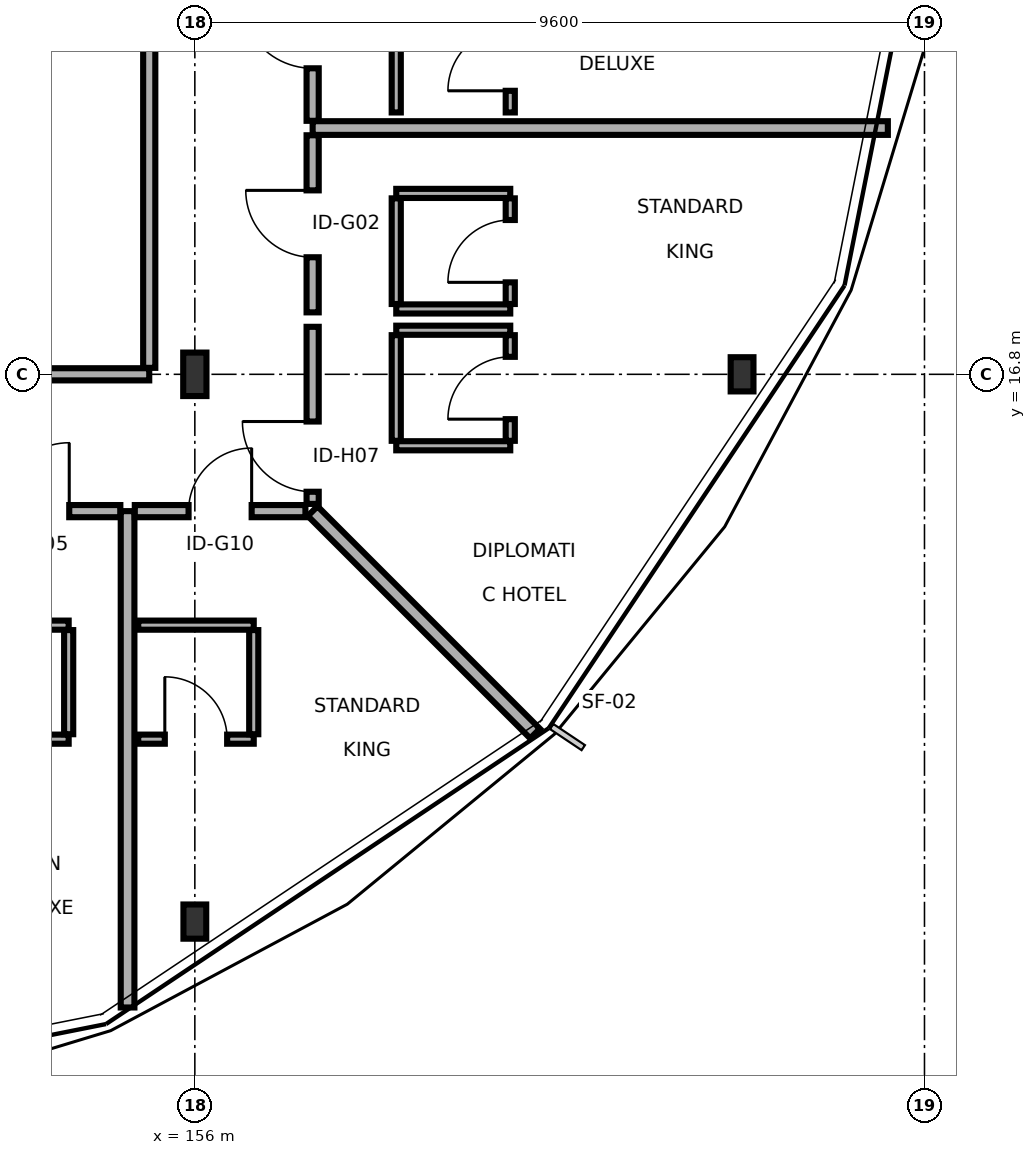
"""IFC4 building model, lengths in metres.
Left out: names, types, materials, properties, quantities, classifications, styles, units other than length and angle.
Written with IfcOpenShell. Run it as: python <this file> out.ifc"""

import sys

from ifc_helpers import new_model, si_unit, direction, frame, frame_2d, origin, origin_2d, place, context, subcontext, project, spatial, rectangle, i_section, extrude, element, fill, save


model = new_model("IFC4")
c1 = context("Model", 3, precision=1e-05, world=origin(), true_north=direction((0.0, 1.0)))
c2 = subcontext(c1, "Body", "Model", "MODEL_VIEW")
j1 = project(units=[si_unit("LENGTHUNIT", "METRE"), si_unit("PLANEANGLEUNIT", "RADIAN")], contexts=[c1])
p1 = place(None, origin())
s1 = spatial("IfcSite", under=j1, at=p1, CompositionType="ELEMENT")
p2 = place(p1, origin())
s2 = spatial("IfcBuilding", under=s1, at=p2, CompositionType="ELEMENT")
p3 = place(p2, frame((0.0, 0.0, 31.7)))
s3 = spatial("IfcBuildingStorey", under=s2, at=p3, CompositionType="ELEMENT", Elevation=31.7)
p4 = place(p3, frame((156.0, 16.8, 0.0), z_axis=(0.0, 0.0, 1.0), x_axis=(1.0, 0.0, 0.0)))
e1 = element("IfcColumn", 1, at=p4, inside=s3, PredefinedType="COLUMN", context=c2, shape_type="SweptSolid", body=[
    extrude(i_section(OverallWidth=0.306, OverallDepth=0.572, WebThickness=0.021, FlangeThickness=0.04, FilletRadius=0.027, at=origin_2d()), origin(), (0.0, 0.0, 1.0), 3.4),
])
for number, where, z_axis, x_axis in (
    (2, (156.0, 9.6, 0.0), (0.0, 0.0, 1.0), (1.0, 0.0, 0.0)),
    (3, (163.2, 16.8, 0.0), (0.0, 0.0, 1.0), (1.0, 0.0, 0.0)),
):
    element("IfcColumn", number, at=place(p3, frame(where, z_axis=z_axis, x_axis=x_axis)), inside=s3, PredefinedType="COLUMN", context=c2, shape_type="SweptSolid", body=[
        extrude(i_section(OverallWidth=0.3, OverallDepth=0.45, WebThickness=0.014, FlangeThickness=0.026, FilletRadius=0.027, at=origin_2d()), origin(), (0.0, 0.0, 1.0), 3.4),
    ])
p5 = place(p3, frame((153.6, 16.8, 0.0), z_axis=(0.0, 0.0, 1.0), x_axis=(1.0, 0.0, 0.0)))
e4 = element("IfcWall", 4, at=p5, inside=s3, PredefinedType="PARTITIONING", context=c2, shape_type="SweptSolid", body=[
    extrude(rectangle(XDim=1.8, YDim=0.16, at=frame_2d((0.9, 0.0))), origin(), (0.0, 0.0, 1.0), 2.705),
])
p6 = place(p3, frame((155.4, 16.885, 0.0), z_axis=(0.0, 0.0, 1.0), x_axis=(0.0, 1.0, 0.0)))
e5 = element("IfcWall", 5, at=p6, inside=s3, PredefinedType="PARTITIONING", context=c2, shape_type="SweptSolid", body=[
    extrude(rectangle(XDim=12.03, YDim=0.16, at=frame_2d((6.015, 0.0))), origin(), (0.0, 0.0, 1.0), 2.705),
])
p7 = place(p6, frame((5.365, 0.0, 0.0)))
e6 = element("IfcOpeningElement", 6, at=p7, cuts=e5, PredefinedType="OPENING", context=c2, shape_type="SweptSolid", body=[
    extrude(rectangle(XDim=1.3, YDim=2.2, at=frame_2d((0.65, 1.1))), frame((0.0, 0.09, 0.0), z_axis=(0.0, -1.0, 0.0), x_axis=(1.0, 0.0, 0.0)), (0.0, 0.0, 1.0), 0.18),
])
p8 = place(p3, frame((152.775, 15.0, 0.0), z_axis=(0.0, 0.0, 1.0), x_axis=(1.0, 0.0, 0.0)))
e7 = element("IfcWall", 7, at=p8, inside=s3, PredefinedType="PARTITIONING", context=c2, shape_type="SweptSolid", body=[
    extrude(rectangle(XDim=2.245, YDim=0.16, at=frame_2d((1.123, 0.0))), origin(), (0.0, 0.0, 1.0), 3.17),
])
p9 = place(p8, frame((0.673, 0.0, 0.0)))
e8 = element("IfcOpeningElement", 8, at=p9, cuts=e7, PredefinedType="OPENING", context=c2, shape_type="SweptSolid", body=[
    extrude(rectangle(XDim=0.9, YDim=2.1, at=frame_2d((0.45, 1.05))), frame((0.0, 0.09, 0.0), z_axis=(0.0, -1.0, 0.0), x_axis=(1.0, 0.0, 0.0)), (0.0, 0.0, 1.0), 0.18),
])
p10 = place(p3, frame((152.82, 12.0, 0.0), z_axis=(0.0, 0.0, 1.0), x_axis=(1.0, 0.0, 0.0)))
e9 = element("IfcWall", 9, at=p10, inside=s3, PredefinedType="PARTITIONING", context=c2, shape_type="SweptSolid", body=[
    extrude(rectangle(XDim=1.52, YDim=0.12, at=frame_2d((0.76, 0.0))), origin(), (0.0, 0.0, 1.0), 3.17),
])
p11 = place(p10, frame((0.35, 0.0, 0.0)))
e10 = element("IfcOpeningElement", 10, at=p11, cuts=e9, PredefinedType="OPENING", context=c2, shape_type="SweptSolid", body=[
    extrude(rectangle(XDim=0.82, YDim=2.08, at=frame_2d((0.41, 1.04))), frame((0.0, 0.07, 0.0), z_axis=(0.0, -1.0, 0.0), x_axis=(1.0, 0.0, 0.0)), (0.0, 0.0, 1.0), 0.14),
])
p12 = place(p3, frame((152.82, 13.5, 0.0), z_axis=(0.0, 0.0, 1.0), x_axis=(1.0, 0.0, 0.0)))
e11 = element("IfcWall", 11, at=p12, inside=s3, PredefinedType="PARTITIONING", context=c2, shape_type="SweptSolid", body=[
    extrude(rectangle(XDim=1.52, YDim=0.12, at=frame_2d((0.76, 0.0))), origin(), (0.0, 0.0, 1.0), 3.17),
])
p13 = place(p3, frame((154.34, 12.065, 0.0), z_axis=(0.0, 0.0, 1.0), x_axis=(0.0, 1.0, 0.0)))
e12 = element("IfcWall", 12, at=p13, inside=s3, PredefinedType="PARTITIONING", context=c2, shape_type="SweptSolid", body=[
    extrude(rectangle(XDim=1.37, YDim=0.12, at=frame_2d((0.685, 0.0))), origin(), (0.0, 0.0, 1.0), 3.17),
])
p14 = place(p3, frame((155.115, 8.47, 0.0), z_axis=(0.0, 0.0, 1.0), x_axis=(0.0, 1.0, 0.0)))
e13 = element("IfcWall", 13, at=p14, inside=s3, PredefinedType="PARTITIONING", context=c2, shape_type="SweptSolid", body=[
    extrude(rectangle(XDim=6.53, YDim=0.18, at=frame_2d((3.265, 0.0))), origin(), (0.0, 0.0, 1.0), 2.655),
])
p15 = place(p3, frame((155.21, 15.0, 0.0), z_axis=(0.0, 0.0, 1.0), x_axis=(1.0, 0.0, 0.0)))
e14 = element("IfcWall", 14, at=p15, inside=s3, PredefinedType="PARTITIONING", context=c2, shape_type="SweptSolid", body=[
    extrude(rectangle(XDim=2.245, YDim=0.16, at=frame_2d((1.123, 0.0))), origin(), (0.0, 0.0, 1.0), 2.755),
])
p16 = place(p15, frame((0.708, 0.0, 0.0)))
e15 = element("IfcOpeningElement", 15, at=p16, cuts=e14, PredefinedType="OPENING", context=c2, shape_type="SweptSolid", body=[
    extrude(rectangle(XDim=0.83, YDim=2.11, at=frame_2d((0.415, 1.055))), frame((0.0, 0.09, 0.0), z_axis=(0.0, -1.0, 0.0), x_axis=(1.0, 0.0, 0.0)), (0.0, 0.0, 1.0), 0.18),
])
p17 = place(p3, frame((155.255, 12.0, 0.0), z_axis=(0.0, 0.0, 1.0), x_axis=(1.0, 0.0, 0.0)))
e16 = element("IfcWall", 16, at=p17, inside=s3, PredefinedType="PARTITIONING", context=c2, shape_type="SweptSolid", body=[
    extrude(rectangle(XDim=1.52, YDim=0.12, at=frame_2d((0.76, 0.0))), origin(), (0.0, 0.0, 1.0), 2.755),
])
p18 = place(p17, frame((0.35, 0.0, 0.0)))
e17 = element("IfcOpeningElement", 17, at=p18, cuts=e16, PredefinedType="OPENING", context=c2, shape_type="SweptSolid", body=[
    extrude(rectangle(XDim=0.82, YDim=2.08, at=frame_2d((0.41, 1.04))), frame((0.0, 0.07, 0.0), z_axis=(0.0, -1.0, 0.0), x_axis=(1.0, 0.0, 0.0)), (0.0, 0.0, 1.0), 0.14),
])
p19 = place(p3, frame((155.255, 13.5, 0.0), z_axis=(0.0, 0.0, 1.0), x_axis=(1.0, 0.0, 0.0)))
e18 = element("IfcWall", 18, at=p19, inside=s3, PredefinedType="PARTITIONING", context=c2, shape_type="SweptSolid", body=[
    extrude(rectangle(XDim=1.52, YDim=0.12, at=frame_2d((0.76, 0.0))), origin(), (0.0, 0.0, 1.0), 2.755),
])
p20 = place(p3, frame((156.775, 12.065, 0.0), z_axis=(0.0, 0.0, 1.0), x_axis=(0.0, 1.0, 0.0)))
e19 = element("IfcWall", 19, at=p20, inside=s3, PredefinedType="PARTITIONING", context=c2, shape_type="SweptSolid", body=[
    extrude(rectangle(XDim=1.37, YDim=0.12, at=frame_2d((0.685, 0.0))), origin(), (0.0, 0.0, 1.0), 3.17),
])
p21 = place(p3, frame((157.55, 15.0, 0.0), z_axis=(0.0, 0.0, 1.0), x_axis=(0.707106781187, -0.707106781187, 0.0)))
e20 = element("IfcWall", 20, at=p21, inside=s3, PredefinedType="PARTITIONING", context=c2, shape_type="SweptSolid", body=[
    extrude(rectangle(XDim=4.138, YDim=0.18, at=frame_2d((2.069, 0.0))), origin(), (0.0, 0.0, 1.0), 2.655),
])
p22 = place(p3, frame((157.55, 15.095, 0.0), z_axis=(0.0, 0.0, 1.0), x_axis=(0.0, 1.0, 0.0)))
e21 = element("IfcWall", 21, at=p22, inside=s3, PredefinedType="PARTITIONING", context=c2, shape_type="SweptSolid", body=[
    extrude(rectangle(XDim=2.33, YDim=0.16, at=frame_2d((1.165, 0.0))), origin(), (0.0, 0.0, 1.0), 2.755),
])
p23 = place(p22, frame((0.16, 0.0, 0.0)))
e22 = element("IfcOpeningElement", 22, at=p23, cuts=e21, PredefinedType="OPENING", context=c2, shape_type="SweptSolid", body=[
    extrude(rectangle(XDim=0.924, YDim=2.16, at=frame_2d((0.462, 1.08))), frame((0.0, 0.09, 0.0), z_axis=(0.0, -1.0, 0.0), x_axis=(1.0, 0.0, 0.0)), (0.0, 0.0, 1.0), 0.18),
])
for number, where, z_axis, x_axis in (
    (23, (158.65, 15.86, 0.0), (0.0, 0.0, 1.0), (1.0, 0.0, 0.0)),
    (24, (158.65, 17.38, 0.0), (0.0, 0.0, 1.0), (1.0, 0.0, 0.0)),
):
    element("IfcWall", number, at=place(p3, frame(where, z_axis=z_axis, x_axis=x_axis)), inside=s3, PredefinedType="PARTITIONING", context=c2, shape_type="SweptSolid", body=[
        extrude(rectangle(XDim=1.5, YDim=0.12, at=frame_2d((0.75, 0.0))), origin(), (0.0, 0.0, 1.0), 3.17),
    ])
p24 = place(p3, frame((158.65, 15.925, 0.0), z_axis=(0.0, 0.0, 1.0), x_axis=(0.0, 1.0, 0.0)))
e25 = element("IfcWall", 25, at=p24, inside=s3, PredefinedType="PARTITIONING", context=c2, shape_type="SweptSolid", body=[
    extrude(rectangle(XDim=1.39, YDim=0.12, at=frame_2d((0.695, 0.0))), origin(), (0.0, 0.0, 1.0), 2.755),
])
p25 = place(p3, frame((160.15, 15.925, 0.0), z_axis=(0.0, 0.0, 1.0), x_axis=(0.0, 1.0, 0.0)))
e26 = element("IfcWall", 26, at=p25, inside=s3, PredefinedType="PARTITIONING", context=c2, shape_type="SweptSolid", body=[
    extrude(rectangle(XDim=1.39, YDim=0.12, at=frame_2d((0.695, 0.0))), origin(), (0.0, 0.0, 1.0), 2.755),
])
p26 = place(p25, frame((0.285, 0.0, 0.0)))
e27 = element("IfcOpeningElement", 27, at=p26, cuts=e26, PredefinedType="OPENING", context=c2, shape_type="SweptSolid", body=[
    extrude(rectangle(XDim=0.82, YDim=2.08, at=frame_2d((0.41, 1.04))), frame((0.0, 0.07, 0.0), z_axis=(0.0, -1.0, 0.0), x_axis=(1.0, 0.0, 0.0)), (0.0, 0.0, 1.0), 0.14),
])
p27 = place(p3, frame((157.55, 17.615, 0.0), z_axis=(0.0, 0.0, 1.0), x_axis=(0.0, 1.0, 0.0)))
e28 = element("IfcWall", 28, at=p27, inside=s3, PredefinedType="PARTITIONING", context=c2, shape_type="SweptSolid", body=[
    extrude(rectangle(XDim=2.33, YDim=0.16, at=frame_2d((1.165, 0.0))), origin(), (0.0, 0.0, 1.0), 3.17),
])
p28 = place(p27, frame((0.725, 0.0, 0.0)))
e29 = element("IfcOpeningElement", 29, at=p28, cuts=e28, PredefinedType="OPENING", context=c2, shape_type="SweptSolid", body=[
    extrude(rectangle(XDim=0.88, YDim=2.05, at=frame_2d((0.44, 1.025))), frame((0.0, 0.09, 0.0), z_axis=(0.0, -1.0, 0.0), x_axis=(1.0, 0.0, 0.0)), (0.0, 0.0, 1.0), 0.18),
])
for number, where, z_axis, x_axis in (
    (30, (158.65, 17.66, 0.0), (0.0, 0.0, 1.0), (1.0, 0.0, 0.0)),
    (31, (158.65, 19.18, 0.0), (0.0, 0.0, 1.0), (1.0, 0.0, 0.0)),
):
    element("IfcWall", number, at=place(p3, frame(where, z_axis=z_axis, x_axis=x_axis)), inside=s3, PredefinedType="PARTITIONING", context=c2, shape_type="SweptSolid", body=[
        extrude(rectangle(XDim=1.5, YDim=0.12, at=frame_2d((0.75, 0.0))), origin(), (0.0, 0.0, 1.0), 3.17),
    ])
p29 = place(p3, frame((158.65, 17.725, 0.0), z_axis=(0.0, 0.0, 1.0), x_axis=(0.0, 1.0, 0.0)))
e32 = element("IfcWall", 32, at=p29, inside=s3, PredefinedType="PARTITIONING", context=c2, shape_type="SweptSolid", body=[
    extrude(rectangle(XDim=1.39, YDim=0.12, at=frame_2d((0.695, 0.0))), origin(), (0.0, 0.0, 1.0), 3.17),
])
p30 = place(p3, frame((160.15, 17.725, 0.0), z_axis=(0.0, 0.0, 1.0), x_axis=(0.0, 1.0, 0.0)))
e33 = element("IfcWall", 33, at=p30, inside=s3, PredefinedType="PARTITIONING", context=c2, shape_type="SweptSolid", body=[
    extrude(rectangle(XDim=1.39, YDim=0.12, at=frame_2d((0.695, 0.0))), origin(), (0.0, 0.0, 1.0), 3.17),
])
p31 = place(p30, frame((0.285, 0.0, 0.0)))
e34 = element("IfcOpeningElement", 34, at=p31, cuts=e33, PredefinedType="OPENING", context=c2, shape_type="SweptSolid", body=[
    extrude(rectangle(XDim=0.82, YDim=2.08, at=frame_2d((0.41, 1.04))), frame((0.0, 0.07, 0.0), z_axis=(0.0, -1.0, 0.0), x_axis=(1.0, 0.0, 0.0)), (0.0, 0.0, 1.0), 0.14),
])
p32 = place(p3, frame((157.55, 20.04, 0.0), z_axis=(0.0, 0.0, 1.0), x_axis=(1.0, 0.0, 0.0)))
e35 = element("IfcWall", 35, at=p32, inside=s3, PredefinedType="PARTITIONING", context=c2, shape_type="SweptSolid", body=[
    extrude(rectangle(XDim=7.568, YDim=0.18, at=frame_2d((3.784, 0.0))), origin(), (0.0, 0.0, 1.0), 2.655),
])
p33 = place(p3, frame((157.55, 20.135, 0.0), z_axis=(0.0, 0.0, 1.0), x_axis=(0.0, 1.0, 0.0)))
e36 = element("IfcWall", 36, at=p33, inside=s3, PredefinedType="PARTITIONING", context=c2, shape_type="SweptSolid", body=[
    extrude(rectangle(XDim=2.33, YDim=0.16, at=frame_2d((1.165, 0.0))), origin(), (0.0, 0.0, 1.0), 3.17),
])
p34 = place(p33, frame((0.691, 0.0, 0.0)))
e37 = element("IfcOpeningElement", 37, at=p34, cuts=e36, PredefinedType="OPENING", context=c2, shape_type="SweptSolid", body=[
    extrude(rectangle(XDim=0.948, YDim=2.1, at=frame_2d((0.474, 1.05))), frame((0.0, 0.09, 0.0), z_axis=(0.0, -1.0, 0.0), x_axis=(1.0, 0.0, 0.0)), (0.0, 0.0, 1.0), 0.18),
])
p35 = place(p3, frame((158.65, 20.245, 0.0), z_axis=(0.0, 0.0, 1.0), x_axis=(0.0, 1.0, 0.0)))
e38 = element("IfcWall", 38, at=p35, inside=s3, PredefinedType="PARTITIONING", context=c2, shape_type="SweptSolid", body=[
    extrude(rectangle(XDim=1.39, YDim=0.12, at=frame_2d((0.695, 0.0))), origin(), (0.0, 0.0, 1.0), 3.17),
])
p36 = place(p3, frame((160.15, 20.245, 0.0), z_axis=(0.0, 0.0, 1.0), x_axis=(0.0, 1.0, 0.0)))
e39 = element("IfcWall", 39, at=p36, inside=s3, PredefinedType="PARTITIONING", context=c2, shape_type="SweptSolid", body=[
    extrude(rectangle(XDim=1.39, YDim=0.12, at=frame_2d((0.695, 0.0))), origin(), (0.0, 0.0, 1.0), 3.17),
])
p37 = place(p36, frame((0.285, 0.0, 0.0)))
e40 = element("IfcOpeningElement", 40, at=p37, cuts=e39, PredefinedType="OPENING", context=c2, shape_type="SweptSolid", body=[
    extrude(rectangle(XDim=0.82, YDim=2.08, at=frame_2d((0.41, 1.04))), frame((0.0, 0.07, 0.0), z_axis=(0.0, -1.0, 0.0), x_axis=(1.0, 0.0, 0.0)), (0.0, 0.0, 1.0), 0.14),
])
p38 = place(p9, origin())
e41 = element("IfcDoor", 41, at=p38, inside=s3, OperationType="SINGLE_SWING_RIGHT", PredefinedType="DOOR", context=c2, shape_type="SweptSolid", body=[
    extrude(rectangle(XDim=0.9, YDim=2.1, at=frame_2d((0.45, 1.05))), frame((0.0, 0.025, 0.0), z_axis=(0.0, -1.0, 0.0), x_axis=(1.0, 0.0, 0.0)), (0.0, 0.0, 1.0), 0.05),
])
fill(e8, e41)
p39 = place(p16, origin())
e42 = element("IfcDoor", 42, at=p39, inside=s3, OperationType="SINGLE_SWING_RIGHT", PredefinedType="DOOR", context=c2, shape_type="SweptSolid", body=[
    extrude(rectangle(XDim=0.83, YDim=2.11, at=frame_2d((0.415, 1.055))), frame((0.0, 0.025, 0.0), z_axis=(0.0, -1.0, 0.0), x_axis=(1.0, 0.0, 0.0)), (0.0, 0.0, 1.0), 0.05),
])
fill(e15, e42)
p40 = place(p18, origin())
e43 = element("IfcDoor", 43, at=p40, inside=s3, OperationType="SINGLE_SWING_LEFT", PredefinedType="DOOR", context=c2, shape_type="SweptSolid", body=[
    extrude(rectangle(XDim=0.82, YDim=2.08, at=frame_2d((0.41, 1.04))), frame((0.0, 0.025, 0.0), z_axis=(0.0, -1.0, 0.0), x_axis=(1.0, 0.0, 0.0)), (0.0, 0.0, 1.0), 0.05),
])
fill(e17, e43)
p41 = place(p23, origin())
e44 = element("IfcDoor", 44, at=p41, inside=s3, OperationType="SINGLE_SWING_RIGHT", PredefinedType="DOOR", context=c2, shape_type="SweptSolid", body=[
    extrude(rectangle(XDim=0.924, YDim=2.16, at=frame_2d((0.462, 1.08))), frame((0.0, 0.025, 0.0), z_axis=(0.0, -1.0, 0.0), x_axis=(1.0, 0.0, 0.0)), (0.0, 0.0, 1.0), 0.05),
])
fill(e22, e44)
p42 = place(p26, origin())
e45 = element("IfcDoor", 45, at=p42, inside=s3, OperationType="SINGLE_SWING_LEFT", PredefinedType="DOOR", context=c2, shape_type="SweptSolid", body=[
    extrude(rectangle(XDim=0.82, YDim=2.08, at=frame_2d((0.41, 1.04))), frame((0.0, 0.025, 0.0), z_axis=(0.0, -1.0, 0.0), x_axis=(1.0, 0.0, 0.0)), (0.0, 0.0, 1.0), 0.05),
])
fill(e27, e45)
p43 = place(p28, origin())
e46 = element("IfcDoor", 46, at=p43, inside=s3, OperationType="SINGLE_SWING_RIGHT", PredefinedType="DOOR", context=c2, shape_type="SweptSolid", body=[
    extrude(rectangle(XDim=0.88, YDim=2.05, at=frame_2d((0.44, 1.025))), frame((0.0, 0.025, 0.0), z_axis=(0.0, -1.0, 0.0), x_axis=(1.0, 0.0, 0.0)), (0.0, 0.0, 1.0), 0.05),
])
fill(e29, e46)
p44 = place(p31, origin())
e47 = element("IfcDoor", 47, at=p44, inside=s3, OperationType="SINGLE_SWING_LEFT", PredefinedType="DOOR", context=c2, shape_type="SweptSolid", body=[
    extrude(rectangle(XDim=0.82, YDim=2.08, at=frame_2d((0.41, 1.04))), frame((0.0, 0.025, 0.0), z_axis=(0.0, -1.0, 0.0), x_axis=(1.0, 0.0, 0.0)), (0.0, 0.0, 1.0), 0.05),
])
fill(e34, e47)
p45 = place(p34, origin())
e48 = element("IfcDoor", 48, at=p45, inside=s3, OperationType="SINGLE_SWING_RIGHT", PredefinedType="DOOR", context=c2, shape_type="SweptSolid", body=[
    extrude(rectangle(XDim=0.948, YDim=2.1, at=frame_2d((0.474, 1.05))), frame((0.0, 0.025, 0.0), z_axis=(0.0, -1.0, 0.0), x_axis=(1.0, 0.0, 0.0)), (0.0, 0.0, 1.0), 0.05),
])
fill(e37, e48)
p46 = place(p37, origin())
e49 = element("IfcDoor", 49, at=p46, inside=s3, OperationType="SINGLE_SWING_LEFT", PredefinedType="DOOR", context=c2, shape_type="SweptSolid", body=[
    extrude(rectangle(XDim=0.82, YDim=2.08, at=frame_2d((0.41, 1.04))), frame((0.0, 0.025, 0.0), z_axis=(0.0, -1.0, 0.0), x_axis=(1.0, 0.0, 0.0)), (0.0, 0.0, 1.0), 0.05),
])
fill(e40, e49)
save(model, sys.argv[1])
